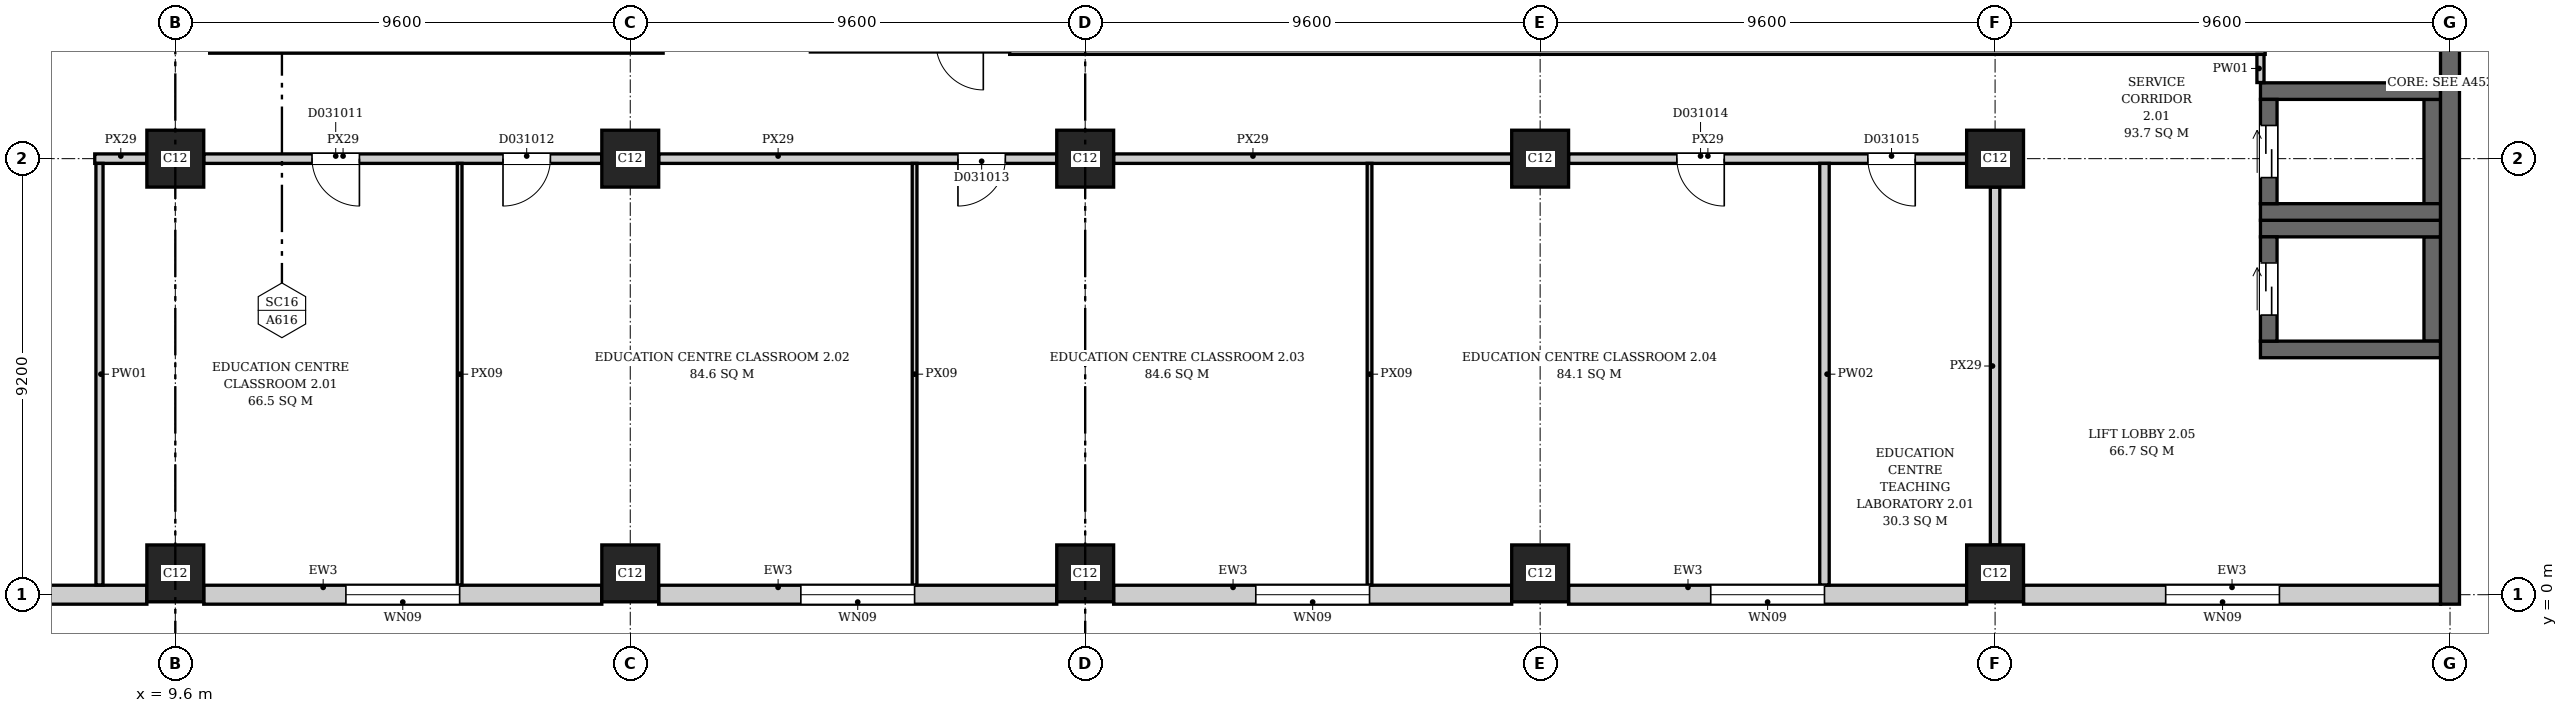
"""IFC4 building model, lengths in metres.
Left out: names, types, materials, properties, quantities, classifications, styles, units other than length and angle.
Written with IfcOpenShell. Run it as: python <this file> out.ifc"""

import sys

from ifc_helpers import new_model, si_unit, direction, frame, frame_2d, origin, origin_2d, place, context, subcontext, project, spatial, rectangle, extrude, element, fill, save


model = new_model("IFC4")
c1 = context("Model", 3, precision=1e-05, world=origin(), true_north=direction((0.0, 1.0)))
c2 = subcontext(c1, "Body", "Model", "MODEL_VIEW")
j1 = project(units=[si_unit("LENGTHUNIT", "METRE"), si_unit("PLANEANGLEUNIT", "RADIAN")], contexts=[c1])
p1 = place(None, origin())
s1 = spatial("IfcSite", under=j1, at=p1, CompositionType="ELEMENT")
p2 = place(p1, origin())
s2 = spatial("IfcBuilding", under=s1, at=p2, CompositionType="ELEMENT")
p3 = place(p2, frame((0.0, 0.0, 14.2)))
s3 = spatial("IfcBuildingStorey", under=s2, at=p3, CompositionType="ELEMENT", Elevation=14.2)
p4 = place(p3, frame((57.6, -0.2, 0.0), z_axis=(0.0, 0.0, 1.0), x_axis=(0.0, 1.0, 0.0)))
e1 = element("IfcWall", 1, at=p4, inside=s3, PredefinedType="SHEAR", context=c2, shape_type="SweptSolid", body=[
    extrude(rectangle(XDim=46.88, YDim=0.4, at=frame_2d((23.44, 0.0))), origin(), (0.0, 0.0, 1.0), 7.5),
])
for number, where, z_axis, x_axis in (
    (2, (53.6, 5.175, 0.0), (0.0, 0.0, 1.0), (1.0, 0.0, 0.0)),
    (3, (53.6, 7.725, 0.0), (0.0, 0.0, 1.0), (1.0, 0.0, 0.0)),
):
    element("IfcWall", number, at=place(p3, frame(where, z_axis=z_axis, x_axis=x_axis)), inside=s3, PredefinedType="SHEAR", context=c2, shape_type="SweptSolid", body=[
        extrude(rectangle(XDim=3.8, YDim=0.35, at=frame_2d((1.9, 0.0))), origin(), (0.0, 0.0, 1.0), 7.5),
    ])
p5 = place(p3, frame((53.775, 5.35, 0.0), z_axis=(0.0, 0.0, 1.0), x_axis=(0.0, 1.0, 0.0)))
e4 = element("IfcWall", 4, at=p5, inside=s3, PredefinedType="SHEAR", context=c2, shape_type="SweptSolid", body=[
    extrude(rectangle(XDim=2.2, YDim=0.35, at=frame_2d((1.1, 0.0))), origin(), (0.0, 0.0, 1.0), 7.5),
])
p6 = place(p5, frame((0.55, 0.0, 0.0)))
e5 = element("IfcOpeningElement", 5, at=p6, cuts=e4, PredefinedType="OPENING", context=c2, shape_type="SweptSolid", body=[
    extrude(rectangle(XDim=1.1, YDim=2.1, at=frame_2d((0.55, 1.05))), frame((0.0, 0.185, 0.0), z_axis=(0.0, -1.0, 0.0), x_axis=(1.0, 0.0, 0.0)), (0.0, 0.0, 1.0), 0.37),
])
p7 = place(p3, frame((57.225, 5.35, 0.0), z_axis=(0.0, 0.0, 1.0), x_axis=(0.0, 1.0, 0.0)))
e6 = element("IfcWall", 6, at=p7, inside=s3, PredefinedType="SHEAR", context=c2, shape_type="SweptSolid", body=[
    extrude(rectangle(XDim=2.2, YDim=0.35, at=frame_2d((1.1, 0.0))), origin(), (0.0, 0.0, 1.0), 7.5),
])
for number, where, z_axis, x_axis in (
    (7, (53.6, 8.075, 0.0), (0.0, 0.0, 1.0), (1.0, 0.0, 0.0)),
    (8, (53.6, 10.625, 0.0), (0.0, 0.0, 1.0), (1.0, 0.0, 0.0)),
):
    element("IfcWall", number, at=place(p3, frame(where, z_axis=z_axis, x_axis=x_axis)), inside=s3, PredefinedType="SHEAR", context=c2, shape_type="SweptSolid", body=[
        extrude(rectangle(XDim=3.8, YDim=0.35, at=frame_2d((1.9, 0.0))), origin(), (0.0, 0.0, 1.0), 7.5),
    ])
p8 = place(p3, frame((53.775, 8.25, 0.0), z_axis=(0.0, 0.0, 1.0), x_axis=(0.0, 1.0, 0.0)))
e9 = element("IfcWall", 9, at=p8, inside=s3, PredefinedType="SHEAR", context=c2, shape_type="SweptSolid", body=[
    extrude(rectangle(XDim=2.2, YDim=0.35, at=frame_2d((1.1, 0.0))), origin(), (0.0, 0.0, 1.0), 7.5),
])
p9 = place(p8, frame((0.55, 0.0, 0.0)))
e10 = element("IfcOpeningElement", 10, at=p9, cuts=e9, PredefinedType="OPENING", context=c2, shape_type="SweptSolid", body=[
    extrude(rectangle(XDim=1.1, YDim=2.1, at=frame_2d((0.55, 1.05))), frame((0.0, 0.185, 0.0), z_axis=(0.0, -1.0, 0.0), x_axis=(1.0, 0.0, 0.0)), (0.0, 0.0, 1.0), 0.37),
])
p10 = place(p3, frame((57.225, 8.25, 0.0), z_axis=(0.0, 0.0, 1.0), x_axis=(0.0, 1.0, 0.0)))
e11 = element("IfcWall", 11, at=p10, inside=s3, PredefinedType="SHEAR", context=c2, shape_type="SweptSolid", body=[
    extrude(rectangle(XDim=2.2, YDim=0.35, at=frame_2d((1.1, 0.0))), origin(), (0.0, 0.0, 1.0), 7.5),
])
for number, where, z_axis, x_axis in (
    (12, (9.6, 0.45, 0.0), (0.0, 0.0, 1.0), (1.0, 0.0, 0.0)),
    (13, (19.2, 0.45, 0.0), (0.0, 0.0, 1.0), (1.0, 0.0, 0.0)),
    (14, (28.8, 0.45, 0.0), (0.0, 0.0, 1.0), (1.0, 0.0, 0.0)),
    (15, (38.4, 0.45, 0.0), (0.0, 0.0, 1.0), (1.0, 0.0, 0.0)),
    (16, (48.0, 0.45, 0.0), (0.0, 0.0, 1.0), (1.0, 0.0, 0.0)),
    (17, (9.6, 9.2, 0.0), (0.0, 0.0, 1.0), (1.0, 0.0, 0.0)),
    (18, (19.2, 9.2, 0.0), (0.0, 0.0, 1.0), (1.0, 0.0, 0.0)),
    (19, (28.8, 9.2, 0.0), (0.0, 0.0, 1.0), (1.0, 0.0, 0.0)),
    (20, (38.4, 9.2, 0.0), (0.0, 0.0, 1.0), (1.0, 0.0, 0.0)),
    (21, (48.0, 9.2, 0.0), (0.0, 0.0, 1.0), (1.0, 0.0, 0.0)),
):
    element("IfcColumn", number, at=place(p3, frame(where, z_axis=z_axis, x_axis=x_axis)), inside=s3, PredefinedType="COLUMN", context=c2, shape_type="SweptSolid", body=[
        extrude(rectangle(XDim=1.2, YDim=1.2, at=origin_2d()), origin(), (0.0, 0.0, 1.0), 7.5),
    ])
p11 = place(p3, frame((0.2, 0.0, 0.0), z_axis=(0.0, 0.0, 1.0), x_axis=(1.0, 0.0, 0.0)))
e22 = element("IfcWall", 22, at=p11, inside=s3, PredefinedType="ELEMENTEDWALL", context=c2, shape_type="SweptSolid", body=[
    extrude(rectangle(XDim=8.8, YDim=0.4, at=frame_2d((4.4, 0.0))), origin(), (0.0, 0.0, 1.0), 7.15),
])
p12 = place(p11, frame((3.4, 0.0, 1.0)))
e23 = element("IfcOpeningElement", 23, at=p12, cuts=e22, PredefinedType="OPENING", context=c2, shape_type="SweptSolid", body=[
    extrude(rectangle(XDim=2.4, YDim=2.2, at=frame_2d((1.2, 1.1))), frame((0.0, 0.21, 0.0), z_axis=(0.0, -1.0, 0.0), x_axis=(1.0, 0.0, 0.0)), (0.0, 0.0, 1.0), 0.42),
])
p13 = place(p3, frame((10.2, 0.0, 0.0), z_axis=(0.0, 0.0, 1.0), x_axis=(1.0, 0.0, 0.0)))
e24 = element("IfcWall", 24, at=p13, inside=s3, PredefinedType="ELEMENTEDWALL", context=c2, shape_type="SweptSolid", body=[
    extrude(rectangle(XDim=8.4, YDim=0.4, at=frame_2d((4.2, 0.0))), origin(), (0.0, 0.0, 1.0), 7.15),
])
p14 = place(p13, frame((3.0, 0.0, 1.0)))
e25 = element("IfcOpeningElement", 25, at=p14, cuts=e24, PredefinedType="OPENING", context=c2, shape_type="SweptSolid", body=[
    extrude(rectangle(XDim=2.4, YDim=2.2, at=frame_2d((1.2, 1.1))), frame((0.0, 0.21, 0.0), z_axis=(0.0, -1.0, 0.0), x_axis=(1.0, 0.0, 0.0)), (0.0, 0.0, 1.0), 0.42),
])
p15 = place(p3, frame((19.8, 0.0, 0.0), z_axis=(0.0, 0.0, 1.0), x_axis=(1.0, 0.0, 0.0)))
e26 = element("IfcWall", 26, at=p15, inside=s3, PredefinedType="ELEMENTEDWALL", context=c2, shape_type="SweptSolid", body=[
    extrude(rectangle(XDim=8.4, YDim=0.4, at=frame_2d((4.2, 0.0))), origin(), (0.0, 0.0, 1.0), 7.15),
])
p16 = place(p15, frame((3.0, 0.0, 1.0)))
e27 = element("IfcOpeningElement", 27, at=p16, cuts=e26, PredefinedType="OPENING", context=c2, shape_type="SweptSolid", body=[
    extrude(rectangle(XDim=2.4, YDim=2.2, at=frame_2d((1.2, 1.1))), frame((0.0, 0.21, 0.0), z_axis=(0.0, -1.0, 0.0), x_axis=(1.0, 0.0, 0.0)), (0.0, 0.0, 1.0), 0.42),
])
p17 = place(p3, frame((29.4, 0.0, 0.0), z_axis=(0.0, 0.0, 1.0), x_axis=(1.0, 0.0, 0.0)))
e28 = element("IfcWall", 28, at=p17, inside=s3, PredefinedType="ELEMENTEDWALL", context=c2, shape_type="SweptSolid", body=[
    extrude(rectangle(XDim=8.4, YDim=0.4, at=frame_2d((4.2, 0.0))), origin(), (0.0, 0.0, 1.0), 7.15),
])
p18 = place(p17, frame((3.0, 0.0, 1.0)))
e29 = element("IfcOpeningElement", 29, at=p18, cuts=e28, PredefinedType="OPENING", context=c2, shape_type="SweptSolid", body=[
    extrude(rectangle(XDim=2.4, YDim=2.2, at=frame_2d((1.2, 1.1))), frame((0.0, 0.21, 0.0), z_axis=(0.0, -1.0, 0.0), x_axis=(1.0, 0.0, 0.0)), (0.0, 0.0, 1.0), 0.42),
])
p19 = place(p3, frame((39.0, 0.0, 0.0), z_axis=(0.0, 0.0, 1.0), x_axis=(1.0, 0.0, 0.0)))
e30 = element("IfcWall", 30, at=p19, inside=s3, PredefinedType="ELEMENTEDWALL", context=c2, shape_type="SweptSolid", body=[
    extrude(rectangle(XDim=8.4, YDim=0.4, at=frame_2d((4.2, 0.0))), origin(), (0.0, 0.0, 1.0), 7.15),
])
p20 = place(p19, frame((3.0, 0.0, 1.0)))
e31 = element("IfcOpeningElement", 31, at=p20, cuts=e30, PredefinedType="OPENING", context=c2, shape_type="SweptSolid", body=[
    extrude(rectangle(XDim=2.4, YDim=2.2, at=frame_2d((1.2, 1.1))), frame((0.0, 0.21, 0.0), z_axis=(0.0, -1.0, 0.0), x_axis=(1.0, 0.0, 0.0)), (0.0, 0.0, 1.0), 0.42),
])
p21 = place(p3, frame((48.6, 0.0, 0.0), z_axis=(0.0, 0.0, 1.0), x_axis=(1.0, 0.0, 0.0)))
e32 = element("IfcWall", 32, at=p21, inside=s3, PredefinedType="ELEMENTEDWALL", context=c2, shape_type="SweptSolid", body=[
    extrude(rectangle(XDim=8.8, YDim=0.4, at=frame_2d((4.4, 0.0))), origin(), (0.0, 0.0, 1.0), 7.15),
])
p22 = place(p21, frame((3.0, 0.0, 1.0)))
e33 = element("IfcOpeningElement", 33, at=p22, cuts=e32, PredefinedType="OPENING", context=c2, shape_type="SweptSolid", body=[
    extrude(rectangle(XDim=2.4, YDim=2.2, at=frame_2d((1.2, 1.1))), frame((0.0, 0.21, 0.0), z_axis=(0.0, -1.0, 0.0), x_axis=(1.0, 0.0, 0.0)), (0.0, 0.0, 1.0), 0.42),
])
p23 = place(p3, frame((7.9, 9.2, 0.0), z_axis=(0.0, 0.0, 1.0), x_axis=(1.0, 0.0, 0.0)))
e34 = element("IfcWall", 34, at=p23, inside=s3, PredefinedType="PARTITIONING", context=c2, shape_type="SweptSolid", body=[
    extrude(rectangle(XDim=1.1, YDim=0.2, at=frame_2d((0.55, 0.0))), origin(), (0.0, 0.0, 1.0), 6.75),
])
p24 = place(p3, frame((8.0, 0.206, 0.0), z_axis=(0.0, 0.0, 1.0), x_axis=(0.0, 1.0, 0.0)))
e35 = element("IfcWall", 35, at=p24, inside=s3, PredefinedType="PARTITIONING", context=c2, shape_type="SweptSolid", body=[
    extrude(rectangle(XDim=8.894, YDim=0.15, at=frame_2d((4.447, 0.0))), origin(), (0.0, 0.0, 1.0), 7.15),
])
p25 = place(p3, frame((10.2, 9.2, 0.0), z_axis=(0.0, 0.0, 1.0), x_axis=(1.0, 0.0, 0.0)))
e36 = element("IfcWall", 36, at=p25, inside=s3, PredefinedType="PARTITIONING", context=c2, shape_type="SweptSolid", body=[
    extrude(rectangle(XDim=8.4, YDim=0.2, at=frame_2d((4.2, 0.0))), origin(), (0.0, 0.0, 1.0), 6.75),
])
p26 = place(p25, frame((2.285, 0.0, 0.0)))
e37 = element("IfcOpeningElement", 37, at=p26, cuts=e36, PredefinedType="OPENING", context=c2, shape_type="SweptSolid", body=[
    extrude(rectangle(XDim=1.0, YDim=2.1, at=frame_2d((0.5, 1.05))), frame((0.0, 0.11, 0.0), z_axis=(0.0, -1.0, 0.0), x_axis=(1.0, 0.0, 0.0)), (0.0, 0.0, 1.0), 0.22),
])
p27 = place(p25, frame((6.315, 0.0, 0.0)))
e38 = element("IfcOpeningElement", 38, at=p27, cuts=e36, PredefinedType="OPENING", context=c2, shape_type="SweptSolid", body=[
    extrude(rectangle(XDim=1.0, YDim=2.1, at=frame_2d((0.5, 1.05))), frame((0.0, 0.11, 0.0), z_axis=(0.0, -1.0, 0.0), x_axis=(1.0, 0.0, 0.0)), (0.0, 0.0, 1.0), 0.22),
])
p28 = place(p3, frame((10.325, 11.5, 0.0), z_axis=(0.0, 0.0, 1.0), x_axis=(1.0, 0.0, 0.0)))
e39 = element("IfcWall", 39, at=p28, inside=s3, PredefinedType="PARTITIONING", context=c2, shape_type="SweptSolid", body=[
    extrude(rectangle(XDim=9.569, YDim=0.15, at=frame_2d((4.785, 0.0))), origin(), (0.0, 0.0, 1.0), 7.15),
])
p29 = place(p3, frame((15.6, 0.206, 0.0), z_axis=(0.0, 0.0, 1.0), x_axis=(0.0, 1.0, 0.0)))
e40 = element("IfcWall", 40, at=p29, inside=s3, PredefinedType="PARTITIONING", context=c2, shape_type="SweptSolid", body=[
    extrude(rectangle(XDim=8.894, YDim=0.1, at=frame_2d((4.447, 0.0))), origin(), (0.0, 0.0, 1.0), 7.15),
])
p30 = place(p3, frame((19.8, 9.2, 0.0), z_axis=(0.0, 0.0, 1.0), x_axis=(1.0, 0.0, 0.0)))
e41 = element("IfcWall", 41, at=p30, inside=s3, PredefinedType="PARTITIONING", context=c2, shape_type="SweptSolid", body=[
    extrude(rectangle(XDim=8.4, YDim=0.2, at=frame_2d((4.2, 0.0))), origin(), (0.0, 0.0, 1.0), 6.75),
])
p31 = place(p30, frame((6.315, 0.0, 0.0)))
e42 = element("IfcOpeningElement", 42, at=p31, cuts=e41, PredefinedType="OPENING", context=c2, shape_type="SweptSolid", body=[
    extrude(rectangle(XDim=1.0, YDim=2.1, at=frame_2d((0.5, 1.05))), frame((0.0, 0.11, 0.0), z_axis=(0.0, -1.0, 0.0), x_axis=(1.0, 0.0, 0.0)), (0.0, 0.0, 1.0), 0.22),
])
p32 = place(p3, frame((25.2, 0.206, 0.0), z_axis=(0.0, 0.0, 1.0), x_axis=(0.0, 1.0, 0.0)))
e43 = element("IfcWall", 43, at=p32, inside=s3, PredefinedType="PARTITIONING", context=c2, shape_type="SweptSolid", body=[
    extrude(rectangle(XDim=8.894, YDim=0.1, at=frame_2d((4.447, 0.0))), origin(), (0.0, 0.0, 1.0), 7.15),
])
p33 = place(p3, frame((27.206, 11.5, 0.0), z_axis=(0.0, 0.0, 1.0), x_axis=(1.0, 0.0, 0.0)))
e44 = element("IfcWall", 44, at=p33, inside=s3, PredefinedType="PARTITIONING", context=c2, shape_type="SweptSolid", body=[
    extrude(rectangle(XDim=26.494, YDim=0.2, at=frame_2d((13.247, 0.0))), origin(), (0.0, 0.0, 1.0), 7.15),
])
p34 = place(p3, frame((29.4, 9.2, 0.0), z_axis=(0.0, 0.0, 1.0), x_axis=(1.0, 0.0, 0.0)))
e45 = element("IfcWall", 45, at=p34, inside=s3, PredefinedType="PARTITIONING", context=c2, shape_type="SweptSolid", body=[
    extrude(rectangle(XDim=8.4, YDim=0.2, at=frame_2d((4.2, 0.0))), origin(), (0.0, 0.0, 1.0), 6.75),
])
p35 = place(p3, frame((34.8, 0.206, 0.0), z_axis=(0.0, 0.0, 1.0), x_axis=(0.0, 1.0, 0.0)))
e46 = element("IfcWall", 46, at=p35, inside=s3, PredefinedType="PARTITIONING", context=c2, shape_type="SweptSolid", body=[
    extrude(rectangle(XDim=8.894, YDim=0.1, at=frame_2d((4.447, 0.0))), origin(), (0.0, 0.0, 1.0), 7.15),
])
p36 = place(p3, frame((39.0, 9.2, 0.0), z_axis=(0.0, 0.0, 1.0), x_axis=(1.0, 0.0, 0.0)))
e47 = element("IfcWall", 47, at=p36, inside=s3, PredefinedType="PARTITIONING", context=c2, shape_type="SweptSolid", body=[
    extrude(rectangle(XDim=8.4, YDim=0.2, at=frame_2d((4.2, 0.0))), origin(), (0.0, 0.0, 1.0), 6.75),
])
p37 = place(p36, frame((2.285, 0.0, 0.0)))
e48 = element("IfcOpeningElement", 48, at=p37, cuts=e47, PredefinedType="OPENING", context=c2, shape_type="SweptSolid", body=[
    extrude(rectangle(XDim=1.0, YDim=2.1, at=frame_2d((0.5, 1.05))), frame((0.0, 0.11, 0.0), z_axis=(0.0, -1.0, 0.0), x_axis=(1.0, 0.0, 0.0)), (0.0, 0.0, 1.0), 0.22),
])
p38 = place(p36, frame((6.315, 0.0, 0.0)))
e49 = element("IfcOpeningElement", 49, at=p38, cuts=e47, PredefinedType="OPENING", context=c2, shape_type="SweptSolid", body=[
    extrude(rectangle(XDim=1.0, YDim=2.1, at=frame_2d((0.5, 1.05))), frame((0.0, 0.11, 0.0), z_axis=(0.0, -1.0, 0.0), x_axis=(1.0, 0.0, 0.0)), (0.0, 0.0, 1.0), 0.22),
])
p39 = place(p3, frame((44.4, 0.206, 0.0), z_axis=(0.0, 0.0, 1.0), x_axis=(0.0, 1.0, 0.0)))
e50 = element("IfcWall", 50, at=p39, inside=s3, PredefinedType="PARTITIONING", context=c2, shape_type="SweptSolid", body=[
    extrude(rectangle(XDim=8.894, YDim=0.2, at=frame_2d((4.447, 0.0))), origin(), (0.0, 0.0, 1.0), 7.15),
])
p40 = place(p3, frame((48.0, 1.05, 0.0), z_axis=(0.0, 0.0, 1.0), x_axis=(0.0, 1.0, 0.0)))
e51 = element("IfcWall", 51, at=p40, inside=s3, PredefinedType="PARTITIONING", context=c2, shape_type="SweptSolid", body=[
    extrude(rectangle(XDim=7.55, YDim=0.2, at=frame_2d((3.775, 0.0))), origin(), (0.0, 0.0, 1.0), 6.75),
])
p41 = place(p3, frame((53.6, 10.806, 0.0), z_axis=(0.0, 0.0, 1.0), x_axis=(0.0, 1.0, 0.0)))
e52 = element("IfcWall", 52, at=p41, inside=s3, PredefinedType="PARTITIONING", context=c2, shape_type="SweptSolid", body=[
    extrude(rectangle(XDim=0.594, YDim=0.15, at=frame_2d((0.297, 0.0))), origin(), (0.0, 0.0, 1.0), 7.15),
])
p42 = place(p14, origin())
e53 = element("IfcWindow", 53, at=p42, inside=s3, PartitioningType="SINGLE_PANEL", PredefinedType="WINDOW", context=c2, shape_type="SweptSolid", body=[
    extrude(rectangle(XDim=2.4, YDim=2.2, at=frame_2d((1.2, 1.1))), frame((0.0, 0.03, 0.0), z_axis=(0.0, -1.0, 0.0), x_axis=(1.0, 0.0, 0.0)), (0.0, 0.0, 1.0), 0.06),
])
fill(e25, e53)
p43 = place(p16, origin())
e54 = element("IfcWindow", 54, at=p43, inside=s3, PartitioningType="SINGLE_PANEL", PredefinedType="WINDOW", context=c2, shape_type="SweptSolid", body=[
    extrude(rectangle(XDim=2.4, YDim=2.2, at=frame_2d((1.2, 1.1))), frame((0.0, 0.03, 0.0), z_axis=(0.0, -1.0, 0.0), x_axis=(1.0, 0.0, 0.0)), (0.0, 0.0, 1.0), 0.06),
])
fill(e27, e54)
p44 = place(p18, origin())
e55 = element("IfcWindow", 55, at=p44, inside=s3, PartitioningType="SINGLE_PANEL", PredefinedType="WINDOW", context=c2, shape_type="SweptSolid", body=[
    extrude(rectangle(XDim=2.4, YDim=2.2, at=frame_2d((1.2, 1.1))), frame((0.0, 0.03, 0.0), z_axis=(0.0, -1.0, 0.0), x_axis=(1.0, 0.0, 0.0)), (0.0, 0.0, 1.0), 0.06),
])
fill(e29, e55)
p45 = place(p20, origin())
e56 = element("IfcWindow", 56, at=p45, inside=s3, PartitioningType="SINGLE_PANEL", PredefinedType="WINDOW", context=c2, shape_type="SweptSolid", body=[
    extrude(rectangle(XDim=2.4, YDim=2.2, at=frame_2d((1.2, 1.1))), frame((0.0, 0.03, 0.0), z_axis=(0.0, -1.0, 0.0), x_axis=(1.0, 0.0, 0.0)), (0.0, 0.0, 1.0), 0.06),
])
fill(e31, e56)
p46 = place(p22, origin())
e57 = element("IfcWindow", 57, at=p46, inside=s3, PartitioningType="SINGLE_PANEL", PredefinedType="WINDOW", context=c2, shape_type="SweptSolid", body=[
    extrude(rectangle(XDim=2.4, YDim=2.2, at=frame_2d((1.2, 1.1))), frame((0.0, 0.03, 0.0), z_axis=(0.0, -1.0, 0.0), x_axis=(1.0, 0.0, 0.0)), (0.0, 0.0, 1.0), 0.06),
])
fill(e33, e57)
p47 = place(p6, origin())
e58 = element("IfcDoor", 58, at=p47, inside=s3, OperationType="DOUBLE_DOOR_SLIDING", PredefinedType="DOOR", context=c2, shape_type="SweptSolid", body=[
    extrude(rectangle(XDim=1.1, YDim=2.1, at=frame_2d((0.55, 1.05))), frame((0.0, 0.025, 0.0), z_axis=(0.0, -1.0, 0.0), x_axis=(1.0, 0.0, 0.0)), (0.0, 0.0, 1.0), 0.05),
])
fill(e5, e58)
p48 = place(p9, origin())
e59 = element("IfcDoor", 59, at=p48, inside=s3, OperationType="DOUBLE_DOOR_SLIDING", PredefinedType="DOOR", context=c2, shape_type="SweptSolid", body=[
    extrude(rectangle(XDim=1.1, YDim=2.1, at=frame_2d((0.55, 1.05))), frame((0.0, 0.025, 0.0), z_axis=(0.0, -1.0, 0.0), x_axis=(1.0, 0.0, 0.0)), (0.0, 0.0, 1.0), 0.05),
])
fill(e10, e59)
p49 = place(p26, origin())
e60 = element("IfcDoor", 60, at=p49, inside=s3, OperationType="SINGLE_SWING_RIGHT", PredefinedType="DOOR", context=c2, shape_type="SweptSolid", body=[
    extrude(rectangle(XDim=1.0, YDim=2.1, at=frame_2d((0.5, 1.05))), frame((0.0, 0.025, 0.0), z_axis=(0.0, -1.0, 0.0), x_axis=(1.0, 0.0, 0.0)), (0.0, 0.0, 1.0), 0.05),
])
fill(e37, e60)
p50 = place(p27, origin())
e61 = element("IfcDoor", 61, at=p50, inside=s3, OperationType="SINGLE_SWING_LEFT", PredefinedType="DOOR", context=c2, shape_type="SweptSolid", body=[
    extrude(rectangle(XDim=1.0, YDim=2.1, at=frame_2d((0.5, 1.05))), frame((0.0, 0.025, 0.0), z_axis=(0.0, -1.0, 0.0), x_axis=(1.0, 0.0, 0.0)), (0.0, 0.0, 1.0), 0.05),
])
fill(e38, e61)
p51 = place(p31, origin())
e62 = element("IfcDoor", 62, at=p51, inside=s3, OperationType="SINGLE_SWING_LEFT", PredefinedType="DOOR", context=c2, shape_type="SweptSolid", body=[
    extrude(rectangle(XDim=1.0, YDim=2.1, at=frame_2d((0.5, 1.05))), frame((0.0, 0.025, 0.0), z_axis=(0.0, -1.0, 0.0), x_axis=(1.0, 0.0, 0.0)), (0.0, 0.0, 1.0), 0.05),
])
fill(e42, e62)
p52 = place(p37, origin())
e63 = element("IfcDoor", 63, at=p52, inside=s3, OperationType="SINGLE_SWING_RIGHT", PredefinedType="DOOR", context=c2, shape_type="SweptSolid", body=[
    extrude(rectangle(XDim=1.0, YDim=2.1, at=frame_2d((0.5, 1.05))), frame((0.0, 0.025, 0.0), z_axis=(0.0, -1.0, 0.0), x_axis=(1.0, 0.0, 0.0)), (0.0, 0.0, 1.0), 0.05),
])
fill(e48, e63)
p53 = place(p38, origin())
e64 = element("IfcDoor", 64, at=p53, inside=s3, OperationType="SINGLE_SWING_RIGHT", PredefinedType="DOOR", context=c2, shape_type="SweptSolid", body=[
    extrude(rectangle(XDim=1.0, YDim=2.1, at=frame_2d((0.5, 1.05))), frame((0.0, 0.025, 0.0), z_axis=(0.0, -1.0, 0.0), x_axis=(1.0, 0.0, 0.0)), (0.0, 0.0, 1.0), 0.05),
])
fill(e49, e64)
save(model, sys.argv[1])
